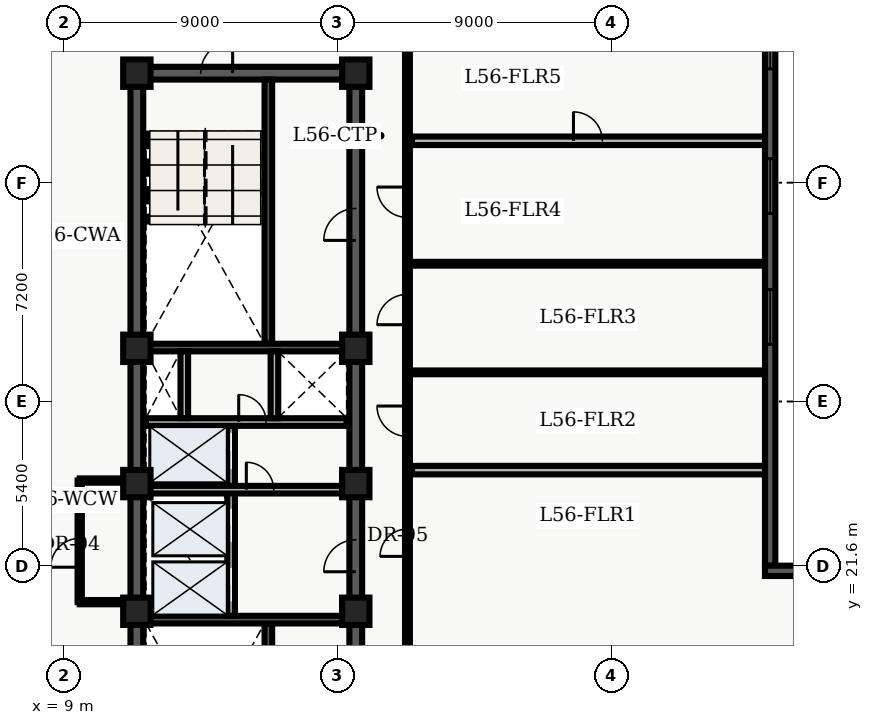
"""IFC4 building model, lengths in metres.
Left out: names, types, materials, properties, quantities, classifications, styles, units other than length and angle.
Written with IfcOpenShell. Run it as: python <this file> out.ifc"""

import sys

from ifc_helpers import new_model, entity, si_unit, converted_unit, direction, frame, origin_with_axes, origin_2d_with_axis, place, context, subcontext, project, spatial, polyline, rectangle, outline, extrude, element, fill, save


model = new_model("IFC4")
c1 = context("Model", 3, precision=1e-05, world=origin_with_axes(), true_north=direction((0.0, 1.0)))
c2 = subcontext(c1, "Body", "Model", "MODEL_VIEW")
j1 = project(units=[si_unit("LENGTHUNIT", "METRE"), converted_unit("PLANEANGLEUNIT", "DEGREE", entity("IfcPlaneAngleMeasure", 0.017), si_unit("PLANEANGLEUNIT", "RADIAN"), dimensions=[0, 0, 0, 0, 0, 0, 0])], contexts=[c1])
p1 = place(None, origin_with_axes())
s1 = spatial("IfcSite", under=j1, at=p1, CompositionType="ELEMENT")
p2 = place(p1, origin_with_axes())
s2 = spatial("IfcBuilding", under=s1, at=p2, CompositionType="ELEMENT")
p3 = place(p2, frame((0.0, 0.0, 228.6), z_axis=(0.0, 0.0, 1.0), x_axis=(1.0, 0.0, 0.0)))
s3 = spatial("IfcBuildingStorey", under=s2, at=p3, CompositionType="ELEMENT", Elevation=228.6)
p4 = place(p3, frame((11.4, 10.8, 0.0), z_axis=(0.0, 0.0, 1.0), x_axis=(0.0, 1.0, 0.0)))
e1 = element("IfcWall", 1, at=p4, inside=s3, PredefinedType="SHEAR", context=c2, shape_type="SweptSolid", body=[
    extrude(outline(polyline([(0.0, -0.21), (27.0, -0.21), (27.0, 0.21), (0.0, 0.21), (0.0, -0.21)])), origin_with_axes(), (0.0, 0.0, 1.0), 3.66),
])
p5 = place(p3, frame((11.4, 37.8, 0.0), z_axis=(0.0, 0.0, 1.0), x_axis=(1.0, 0.0, 0.0)))
e2 = element("IfcWall", 2, at=p5, inside=s3, PredefinedType="SHEAR", context=c2, shape_type="SweptSolid", body=[
    extrude(outline(polyline([(0.0, -0.21), (7.2, -0.21), (7.2, 0.21), (0.0, 0.21), (0.0, -0.21)])), origin_with_axes(), (0.0, 0.0, 1.0), 3.66),
])
p6 = place(p5, frame((2.625, 0.0, 0.0), z_axis=(0.0, 0.0, 1.0), x_axis=(1.0, 0.0, 0.0)))
e3 = element("IfcOpeningElement", 3, at=p6, cuts=e2, PredefinedType="OPENING", context=c2, shape_type="SweptSolid", body=[
    extrude(rectangle(XDim=1.05, YDim=0.44, at=origin_2d_with_axis()), origin_with_axes(), (0.0, 0.0, 1.0), 2.15),
])
p7 = place(p3, frame((18.6, 10.8, 0.0), z_axis=(0.0, 0.0, 1.0), x_axis=(0.0, 1.0, 0.0)))
e4 = element("IfcWall", 4, at=p7, inside=s3, PredefinedType="SHEAR", context=c2, shape_type="SweptSolid", body=[
    extrude(outline(polyline([(0.0, -0.21), (13.5, -0.21), (13.5, 0.21), (0.0, 0.21), (0.0, -0.21)])), origin_with_axes(), (0.0, 0.0, 1.0), 3.66),
])
p8 = place(p7, frame((1.3, 0.0, 0.0), z_axis=(0.0, 0.0, 1.0), x_axis=(1.0, 0.0, 0.0)))
e5 = element("IfcOpeningElement", 5, at=p8, cuts=e4, PredefinedType="OPENING", context=c2, shape_type="SweptSolid", body=[
    extrude(rectangle(XDim=1.1, YDim=0.44, at=origin_2d_with_axis()), origin_with_axes(), (0.0, 0.0, 1.0), 2.15),
])
p9 = place(p7, frame((3.4, 0.0, 0.0), z_axis=(0.0, 0.0, 1.0), x_axis=(1.0, 0.0, 0.0)))
e6 = element("IfcOpeningElement", 6, at=p9, cuts=e4, PredefinedType="OPENING", context=c2, shape_type="SweptSolid", body=[
    extrude(rectangle(XDim=1.1, YDim=0.44, at=origin_2d_with_axis()), origin_with_axes(), (0.0, 0.0, 1.0), 2.15),
])
p10 = place(p7, frame((11.125, 0.0, 0.0), z_axis=(0.0, 0.0, 1.0), x_axis=(1.0, 0.0, 0.0)))
e7 = element("IfcOpeningElement", 7, at=p10, cuts=e4, PredefinedType="OPENING", context=c2, shape_type="SweptSolid", body=[
    extrude(rectangle(XDim=1.05, YDim=0.44, at=origin_2d_with_axis()), origin_with_axes(), (0.0, 0.0, 1.0), 2.15),
])
p11 = place(p7, frame((6.675, 0.0, 0.0), z_axis=(0.0, 0.0, 1.0), x_axis=(1.0, 0.0, 0.0)))
e8 = element("IfcOpeningElement", 8, at=p11, cuts=e4, PredefinedType="OPENING", context=c2, shape_type="SweptSolid", body=[
    extrude(rectangle(XDim=0.95, YDim=0.44, at=origin_2d_with_axis()), origin_with_axes(), (0.0, 0.0, 1.0), 2.15),
])
p12 = place(p3, frame((18.6, 24.3, 0.0), z_axis=(0.0, 0.0, 1.0), x_axis=(0.0, 1.0, 0.0)))
e9 = element("IfcWall", 9, at=p12, inside=s3, PredefinedType="SHEAR", context=c2, shape_type="SweptSolid", body=[
    extrude(outline(polyline([(0.0, -0.21), (13.5, -0.21), (13.5, 0.21), (0.0, 0.21), (0.0, -0.21)])), origin_with_axes(), (0.0, 0.0, 1.0), 3.66),
])
p13 = place(p12, frame((8.525, 0.0, 0.0), z_axis=(0.0, 0.0, 1.0), x_axis=(1.0, 0.0, 0.0)))
e10 = element("IfcOpeningElement", 10, at=p13, cuts=e9, PredefinedType="OPENING", context=c2, shape_type="SweptSolid", body=[
    extrude(rectangle(XDim=1.05, YDim=0.44, at=origin_2d_with_axis()), origin_with_axes(), (0.0, 0.0, 1.0), 2.15),
])
p14 = place(p3, frame((15.725, 11.01, 0.0), z_axis=(0.0, 0.0, 1.0), x_axis=(0.0, 1.0, 0.0)))
e11 = element("IfcWall", 11, at=p14, inside=s3, PredefinedType="SHEAR", context=c2, shape_type="SweptSolid", body=[
    extrude(outline(polyline([(0.0, -0.125), (8.69, -0.125), (8.69, 0.125), (0.0, 0.125), (0.0, -0.125)])), origin_with_axes(), (0.0, 0.0, 1.0), 3.66),
])
p15 = place(p3, frame((11.61, 19.825, 0.0), z_axis=(0.0, 0.0, 1.0), x_axis=(1.0, 0.0, 0.0)))
e12 = element("IfcWall", 12, at=p15, inside=s3, PredefinedType="SHEAR", context=c2, shape_type="SweptSolid", body=[
    extrude(outline(polyline([(0.0, -0.125), (6.78, -0.125), (6.78, 0.125), (0.0, 0.125), (0.0, -0.125)])), origin_with_axes(), (0.0, 0.0, 1.0), 3.66),
])
p16 = place(p3, frame((15.725, 28.9, 0.0), z_axis=(0.0, 0.0, 1.0), x_axis=(0.0, 1.0, 0.0)))
e13 = element("IfcWall", 13, at=p16, inside=s3, PredefinedType="SHEAR", context=c2, shape_type="SweptSolid", body=[
    extrude(outline(polyline([(0.0, -0.125), (8.69, -0.125), (8.69, 0.125), (0.0, 0.125), (0.0, -0.125)])), origin_with_axes(), (0.0, 0.0, 1.0), 3.66),
])
p17 = place(p3, frame((11.61, 28.775, 0.0), z_axis=(0.0, 0.0, 1.0), x_axis=(1.0, 0.0, 0.0)))
e14 = element("IfcWall", 14, at=p17, inside=s3, PredefinedType="SHEAR", context=c2, shape_type="SweptSolid", body=[
    extrude(outline(polyline([(0.0, -0.125), (6.78, -0.125), (6.78, 0.125), (0.0, 0.125), (0.0, -0.125)])), origin_with_axes(), (0.0, 0.0, 1.0), 3.66),
])
p18 = place(p3, frame((14.5, 19.95, 0.0), z_axis=(0.0, 0.0, 1.0), x_axis=(0.0, 1.0, 0.0)))
e15 = element("IfcWall", 15, at=p18, inside=s3, PredefinedType="SOLIDWALL", context=c2, shape_type="SweptSolid", body=[
    extrude(outline(polyline([(0.0, -0.125), (6.25, -0.125), (6.25, 0.125), (0.0, 0.125), (0.0, -0.125)])), origin_with_axes(), (0.0, 0.0, 1.0), 2.7),
])
p19 = place(p18, frame((1.025, 0.0, 0.0), z_axis=(0.0, 0.0, 1.0), x_axis=(1.0, 0.0, 0.0)))
e16 = element("IfcOpeningElement", 16, at=p19, cuts=e15, PredefinedType="OPENING", context=c2, shape_type="SweptSolid", body=[
    extrude(rectangle(XDim=1.1, YDim=0.27, at=origin_2d_with_axis()), origin_with_axes(), (0.0, 0.0, 1.0), 2.15),
])
p20 = place(p18, frame((2.975, 0.0, 0.0), z_axis=(0.0, 0.0, 1.0), x_axis=(1.0, 0.0, 0.0)))
e17 = element("IfcOpeningElement", 17, at=p20, cuts=e15, PredefinedType="OPENING", context=c2, shape_type="SweptSolid", body=[
    extrude(rectangle(XDim=1.1, YDim=0.27, at=origin_2d_with_axis()), origin_with_axes(), (0.0, 0.0, 1.0), 2.15),
])
p21 = place(p18, frame((5.425, 0.0, 0.0), z_axis=(0.0, 0.0, 1.0), x_axis=(1.0, 0.0, 0.0)))
e18 = element("IfcOpeningElement", 18, at=p21, cuts=e15, PredefinedType="OPENING", context=c2, shape_type="SweptSolid", body=[
    extrude(rectangle(XDim=1.2, YDim=0.27, at=origin_2d_with_axis()), origin_with_axes(), (0.0, 0.0, 1.0), 2.15),
])
p22 = place(p3, frame((11.7, 24.1, 0.0), z_axis=(0.0, 0.0, 1.0), x_axis=(1.0, 0.0, 0.0)))
e19 = element("IfcWall", 19, at=p22, inside=s3, PredefinedType="SOLIDWALL", context=c2, shape_type="SweptSolid", body=[
    extrude(outline(polyline([(0.0, -0.125), (6.6, -0.125), (6.6, 0.125), (0.0, 0.125), (0.0, -0.125)])), origin_with_axes(), (0.0, 0.0, 1.0), 2.7),
])
p23 = place(p22, frame((3.75, 0.0, 0.0), z_axis=(0.0, 0.0, 1.0), x_axis=(1.0, 0.0, 0.0)))
e20 = element("IfcOpeningElement", 20, at=p23, cuts=e19, PredefinedType="OPENING", context=c2, shape_type="SweptSolid", body=[
    extrude(rectangle(XDim=0.9, YDim=0.27, at=origin_2d_with_axis()), origin_with_axes(), (0.0, 0.0, 1.0), 2.15),
])
p24 = place(p3, frame((11.7, 26.325, 0.0), z_axis=(0.0, 0.0, 1.0), x_axis=(1.0, 0.0, 0.0)))
e21 = element("IfcWall", 21, at=p24, inside=s3, PredefinedType="SOLIDWALL", context=c2, shape_type="SweptSolid", body=[
    extrude(outline(polyline([(0.0, -0.125), (6.6, -0.125), (6.6, 0.125), (0.0, 0.125), (0.0, -0.125)])), origin_with_axes(), (0.0, 0.0, 1.0), 2.7),
])
p25 = place(p24, frame((3.5, 0.0, 0.0), z_axis=(0.0, 0.0, 1.0), x_axis=(1.0, 0.0, 0.0)))
e22 = element("IfcOpeningElement", 22, at=p25, cuts=e21, PredefinedType="OPENING", context=c2, shape_type="SweptSolid", body=[
    extrude(rectangle(XDim=0.9, YDim=0.27, at=origin_2d_with_axis()), origin_with_axes(), (0.0, 0.0, 1.0), 2.15),
])
for number, where, z_axis, x_axis in (
    (23, (12.96, 26.45, 0.0), (0.0, 0.0, 1.0), (0.0, 1.0, 0.0)),
    (24, (15.925, 26.45, 0.0), (0.0, 0.0, 1.0), (0.0, 1.0, 0.0)),
):
    element("IfcWall", number, at=place(p3, frame(where, z_axis=z_axis, x_axis=x_axis)), inside=s3, PredefinedType="SOLIDWALL", context=c2, shape_type="SweptSolid", body=[
        extrude(outline(polyline([(0.0, -0.125), (2.2, -0.125), (2.2, 0.125), (0.0, 0.125), (0.0, -0.125)])), origin_with_axes(), (0.0, 0.0, 1.0), 2.7),
    ])
for number, where, z_axis, x_axis in (
    (25, (11.4, 20.1, 0.0), (0.0, 0.0, 1.0), (1.0, 0.0, 0.0)),
    (26, (11.4, 24.3, 0.0), (0.0, 0.0, 1.0), (1.0, 0.0, 0.0)),
    (27, (11.4, 28.75, 0.0), (0.0, 0.0, 1.0), (1.0, 0.0, 0.0)),
    (28, (11.4, 37.8, 0.0), (0.0, 0.0, 1.0), (1.0, 0.0, 0.0)),
    (29, (18.6, 20.1, 0.0), (0.0, 0.0, 1.0), (1.0, 0.0, 0.0)),
    (30, (18.6, 24.3, 0.0), (0.0, 0.0, 1.0), (1.0, 0.0, 0.0)),
    (31, (18.6, 28.75, 0.0), (0.0, 0.0, 1.0), (1.0, 0.0, 0.0)),
    (32, (18.6, 37.8, 0.0), (0.0, 0.0, 1.0), (1.0, 0.0, 0.0)),
):
    element("IfcColumn", number, at=place(p3, frame(where, z_axis=z_axis, x_axis=x_axis)), inside=s3, PredefinedType="COLUMN", context=c2, shape_type="SweptSolid", body=[
        extrude(rectangle(XDim=0.9, YDim=0.9, at=origin_2d_with_axis()), origin_with_axes(), (0.0, 0.0, 1.0), 3.9),
    ])
p26 = place(p3, frame((9.52, 20.4, 0.0), z_axis=(0.0, 0.0, 1.0), x_axis=(0.0, 1.0, 0.0)))
e33 = element("IfcWall", 33, at=p26, inside=s3, PredefinedType="PARTITIONING", context=c2, shape_type="SweptSolid", body=[
    extrude(outline(polyline([(0.0, -0.07), (4.0, -0.07), (4.0, 0.07), (0.0, 0.07), (0.0, -0.07)])), origin_with_axes(), (0.0, 0.0, 1.0), 2.7),
])
p27 = place(p26, frame((1.625, 0.0, 0.0), z_axis=(0.0, 0.0, 1.0), x_axis=(1.0, 0.0, 0.0)))
e34 = element("IfcOpeningElement", 34, at=p27, cuts=e33, PredefinedType="OPENING", context=c2, shape_type="SweptSolid", body=[
    extrude(rectangle(XDim=0.95, YDim=0.16, at=origin_2d_with_axis()), origin_with_axes(), (0.0, 0.0, 1.0), 2.15),
])
for number, where, z_axis, x_axis in (
    (35, (9.52, 20.4, 0.0), (0.0, 0.0, 1.0), (1.0, 0.0, 0.0)),
    (36, (9.52, 24.4, 0.0), (0.0, 0.0, 1.0), (1.0, 0.0, 0.0)),
):
    element("IfcWall", number, at=place(p3, frame(where, z_axis=z_axis, x_axis=x_axis)), inside=s3, PredefinedType="PARTITIONING", context=c2, shape_type="SweptSolid", body=[
        extrude(outline(polyline([(0.0, -0.07), (1.58, -0.07), (1.58, 0.07), (0.0, 0.07), (0.0, -0.07)])), origin_with_axes(), (0.0, 0.0, 1.0), 2.7),
    ])
p28 = place(p3, frame((20.3, 7.8, 0.0), z_axis=(0.0, 0.0, 1.0), x_axis=(0.0, 1.0, 0.0)))
e37 = element("IfcWall", 37, at=p28, inside=s3, PredefinedType="PARTITIONING", context=c2, shape_type="SweptSolid", body=[
    extrude(outline(polyline([(0.0, -0.08), (32.7, -0.08), (32.7, 0.08), (0.0, 0.08), (0.0, -0.08)])), origin_with_axes(), (0.0, 0.0, 1.0), 2.7),
])
p29 = place(p28, frame((14.556, 0.0, 0.0), z_axis=(0.0, 0.0, 1.0), x_axis=(1.0, 0.0, 0.0)))
e38 = element("IfcOpeningElement", 38, at=p29, cuts=e37, PredefinedType="OPENING", context=c2, shape_type="SweptSolid", body=[
    extrude(rectangle(XDim=0.9, YDim=0.18, at=origin_2d_with_axis()), origin_with_axes(), (0.0, 0.0, 1.0), 2.15),
])
p30 = place(p28, frame((18.551, 0.0, 0.0), z_axis=(0.0, 0.0, 1.0), x_axis=(1.0, 0.0, 0.0)))
e39 = element("IfcOpeningElement", 39, at=p30, cuts=e37, PredefinedType="OPENING", context=c2, shape_type="SweptSolid", body=[
    extrude(rectangle(XDim=1.0, YDim=0.18, at=origin_2d_with_axis()), origin_with_axes(), (0.0, 0.0, 1.0), 2.15),
])
p31 = place(p28, frame((22.226, 0.0, 0.0), z_axis=(0.0, 0.0, 1.0), x_axis=(1.0, 0.0, 0.0)))
e40 = element("IfcOpeningElement", 40, at=p31, cuts=e37, PredefinedType="OPENING", context=c2, shape_type="SweptSolid", body=[
    extrude(rectangle(XDim=1.0, YDim=0.18, at=origin_2d_with_axis()), origin_with_axes(), (0.0, 0.0, 1.0), 2.15),
])
p32 = place(p28, frame((25.754, 0.0, 0.0), z_axis=(0.0, 0.0, 1.0), x_axis=(1.0, 0.0, 0.0)))
e41 = element("IfcOpeningElement", 41, at=p32, cuts=e37, PredefinedType="OPENING", context=c2, shape_type="SweptSolid", body=[
    extrude(rectangle(XDim=1.0, YDim=0.18, at=origin_2d_with_axis()), origin_with_axes(), (0.0, 0.0, 1.0), 2.15),
])
p33 = place(p28, frame((5.775, 0.0, 0.0), z_axis=(0.0, 0.0, 1.0), x_axis=(1.0, 0.0, 0.0)))
e42 = element("IfcOpeningElement", 42, at=p33, cuts=e37, PredefinedType="OPENING", context=c2, shape_type="SweptSolid", body=[
    extrude(rectangle(XDim=1.05, YDim=0.18, at=origin_2d_with_axis()), origin_with_axes(), (0.0, 0.0, 1.0), 2.15),
])
p34 = place(p3, frame((20.45, 24.743, 0.0), z_axis=(0.0, 0.0, 1.0), x_axis=(1.0, 0.0, 0.0)))
e43 = element("IfcWall", 43, at=p34, inside=s3, PredefinedType="PARTITIONING", context=c2, shape_type="SweptSolid", body=[
    extrude(outline(polyline([(0.0, -0.14), (11.615, -0.14), (11.615, 0.14), (0.0, 0.14), (0.0, -0.14)])), origin_with_axes(), (0.0, 0.0, 1.0), 2.7),
])
for number, where, z_axis, x_axis in (
    (44, (20.45, 27.959, 0.0), (0.0, 0.0, 1.0), (1.0, 0.0, 0.0)),
    (45, (20.45, 31.532, 0.0), (0.0, 0.0, 1.0), (1.0, 0.0, 0.0)),
):
    element("IfcWall", number, at=place(p3, frame(where, z_axis=z_axis, x_axis=x_axis)), inside=s3, PredefinedType="PARTITIONING", context=c2, shape_type="SweptSolid", body=[
        extrude(outline(polyline([(0.0, -0.062), (11.615, -0.062), (11.615, 0.062), (0.0, 0.062), (0.0, -0.062)])), origin_with_axes(), (0.0, 0.0, 1.0), 2.7),
    ])
p35 = place(p3, frame((20.45, 35.576, 0.0), z_axis=(0.0, 0.0, 1.0), x_axis=(1.0, 0.0, 0.0)))
e46 = element("IfcWall", 46, at=p35, inside=s3, PredefinedType="PARTITIONING", context=c2, shape_type="SweptSolid", body=[
    extrude(outline(polyline([(0.0, -0.14), (11.615, -0.14), (11.615, 0.14), (0.0, 0.14), (0.0, -0.14)])), origin_with_axes(), (0.0, 0.0, 1.0), 2.7),
])
p36 = place(p35, frame((5.785, 0.0, 0.0), z_axis=(0.0, 0.0, 1.0), x_axis=(1.0, 0.0, 0.0)))
e47 = element("IfcOpeningElement", 47, at=p36, cuts=e46, PredefinedType="OPENING", context=c2, shape_type="SweptSolid", body=[
    extrude(rectangle(XDim=0.95, YDim=0.3, at=origin_2d_with_axis()), origin_with_axes(), (0.0, 0.0, 1.0), 2.15),
])
p37 = place(p3, frame((32.23, 41.82, 0.0), z_axis=(0.0, 0.0, 1.0), x_axis=(0.0, -1.0, 0.0)))
e48 = element("IfcWall", 48, at=p37, inside=s3, PredefinedType="SOLIDWALL", context=c2, shape_type="SweptSolid", body=[
    extrude(outline(polyline([(0.0, -0.17), (20.22, -0.17), (20.22, 0.17), (0.0, 0.17), (0.0, -0.17)])), origin_with_axes(), (0.0, 0.0, 1.0), 3.66),
])
p38 = place(p37, frame((2.978, 0.0, 0.45), z_axis=(0.0, 0.0, 1.0), x_axis=(1.0, 0.0, 0.0)))
e49 = element("IfcOpeningElement", 49, at=p38, cuts=e48, PredefinedType="OPENING", context=c2, shape_type="SweptSolid", body=[
    extrude(rectangle(XDim=1.8, YDim=0.36, at=origin_2d_with_axis()), origin_with_axes(), (0.0, 0.0, 1.0), 2.1),
])
p39 = place(p37, frame((7.732, 0.0, 0.45), z_axis=(0.0, 0.0, 1.0), x_axis=(1.0, 0.0, 0.0)))
e50 = element("IfcOpeningElement", 50, at=p39, cuts=e48, PredefinedType="OPENING", context=c2, shape_type="SweptSolid", body=[
    extrude(rectangle(XDim=1.8, YDim=0.36, at=origin_2d_with_axis()), origin_with_axes(), (0.0, 0.0, 1.0), 2.1),
])
p40 = place(p37, frame((12.037, 0.0, 0.45), z_axis=(0.0, 0.0, 1.0), x_axis=(1.0, 0.0, 0.0)))
e51 = element("IfcOpeningElement", 51, at=p40, cuts=e48, PredefinedType="OPENING", context=c2, shape_type="SweptSolid", body=[
    extrude(rectangle(XDim=1.8, YDim=0.36, at=origin_2d_with_axis()), origin_with_axes(), (0.0, 0.0, 1.0), 2.1),
])
p41 = place(p3, frame((32.06, 21.43, 0.0), z_axis=(0.0, 0.0, 1.0), x_axis=(1.0, 0.0, 0.0)))
e52 = element("IfcWall", 52, at=p41, inside=s3, PredefinedType="SOLIDWALL", context=c2, shape_type="SweptSolid", body=[
    extrude(outline(polyline([(0.0, -0.17), (3.94, -0.17), (3.94, 0.17), (0.0, 0.17), (0.0, -0.17)])), origin_with_axes(), (0.0, 0.0, 1.0), 3.66),
])
p42 = place(p18, frame((1.025, 0.0, 0.0), z_axis=(0.0, 0.0, 1.0), x_axis=(1.0, 0.0, 0.0)))
e53 = element("IfcDoor", 53, at=p42, inside=s3, OperationType="SLIDING_TO_LEFT", PredefinedType="DOOR", context=c2, shape_type="SweptSolid", body=[
    extrude(rectangle(XDim=1.1, YDim=0.09, at=origin_2d_with_axis()), origin_with_axes(), (0.0, 0.0, 1.0), 2.15),
])
fill(e16, e53)
p43 = place(p18, frame((2.975, 0.0, 0.0), z_axis=(0.0, 0.0, 1.0), x_axis=(1.0, 0.0, 0.0)))
e54 = element("IfcDoor", 54, at=p43, inside=s3, OperationType="SLIDING_TO_RIGHT", PredefinedType="DOOR", context=c2, shape_type="SweptSolid", body=[
    extrude(rectangle(XDim=1.1, YDim=0.09, at=origin_2d_with_axis()), origin_with_axes(), (0.0, 0.0, 1.0), 2.15),
])
fill(e17, e54)
p44 = place(p18, frame((5.425, 0.0, 0.0), z_axis=(0.0, 0.0, 1.0), x_axis=(1.0, 0.0, 0.0)))
e55 = element("IfcDoor", 55, at=p44, inside=s3, OperationType="DOUBLE_DOOR_SLIDING", PredefinedType="DOOR", context=c2, shape_type="SweptSolid", body=[
    extrude(rectangle(XDim=1.2, YDim=0.09, at=origin_2d_with_axis()), origin_with_axes(), (0.0, 0.0, 1.0), 2.15),
])
fill(e18, e55)
p45 = place(p5, frame((2.625, 0.0, 0.0), z_axis=(0.0, 0.0, 1.0), x_axis=(1.0, 0.0, 0.0)))
e56 = element("IfcDoor", 56, at=p45, inside=s3, OperationType="SINGLE_SWING_RIGHT", PredefinedType="DOOR", context=c2, shape_type="SweptSolid", body=[
    extrude(rectangle(XDim=1.05, YDim=0.09, at=origin_2d_with_axis()), origin_with_axes(), (0.0, 0.0, 1.0), 2.15),
])
fill(e3, e56)
p46 = place(p7, frame((11.125, 0.0, 0.0), z_axis=(0.0, 0.0, 1.0), x_axis=(1.0, 0.0, 0.0)))
e57 = element("IfcDoor", 57, at=p46, inside=s3, OperationType="SINGLE_SWING_LEFT", PredefinedType="DOOR", context=c2, shape_type="SweptSolid", body=[
    extrude(rectangle(XDim=1.05, YDim=0.09, at=origin_2d_with_axis()), origin_with_axes(), (0.0, 0.0, 1.0), 2.15),
])
fill(e7, e57)
p47 = place(p22, frame((3.75, 0.0, 0.0), z_axis=(0.0, 0.0, 1.0), x_axis=(1.0, 0.0, 0.0)))
e58 = element("IfcDoor", 58, at=p47, inside=s3, OperationType="SINGLE_SWING_LEFT", PredefinedType="DOOR", context=c2, shape_type="SweptSolid", body=[
    extrude(rectangle(XDim=0.9, YDim=0.09, at=origin_2d_with_axis()), origin_with_axes(), (0.0, 0.0, 1.0), 2.15),
])
fill(e20, e58)
p48 = place(p24, frame((3.5, 0.0, 0.0), z_axis=(0.0, 0.0, 1.0), x_axis=(1.0, 0.0, 0.0)))
e59 = element("IfcDoor", 59, at=p48, inside=s3, OperationType="SINGLE_SWING_LEFT", PredefinedType="DOOR", context=c2, shape_type="SweptSolid", body=[
    extrude(rectangle(XDim=0.9, YDim=0.09, at=origin_2d_with_axis()), origin_with_axes(), (0.0, 0.0, 1.0), 2.15),
])
fill(e22, e59)
p49 = place(p12, frame((8.525, 0.0, 0.0), z_axis=(0.0, 0.0, 1.0), x_axis=(1.0, 0.0, 0.0)))
e60 = element("IfcDoor", 60, at=p49, inside=s3, OperationType="SINGLE_SWING_LEFT", PredefinedType="DOOR", context=c2, shape_type="SweptSolid", body=[
    extrude(rectangle(XDim=1.05, YDim=0.09, at=origin_2d_with_axis()), origin_with_axes(), (0.0, 0.0, 1.0), 2.15),
])
fill(e10, e60)
p50 = place(p26, frame((1.625, 0.0, 0.0), z_axis=(0.0, 0.0, 1.0), x_axis=(1.0, 0.0, 0.0)))
e61 = element("IfcDoor", 61, at=p50, inside=s3, OperationType="SINGLE_SWING_LEFT", PredefinedType="DOOR", context=c2, shape_type="SweptSolid", body=[
    extrude(rectangle(XDim=0.95, YDim=0.084, at=origin_2d_with_axis()), origin_with_axes(), (0.0, 0.0, 1.0), 2.15),
])
fill(e34, e61)
p51 = place(p28, frame((14.556, 0.0, 0.0), z_axis=(0.0, 0.0, 1.0), x_axis=(1.0, 0.0, 0.0)))
e62 = element("IfcDoor", 62, at=p51, inside=s3, OperationType="SINGLE_SWING_LEFT", PredefinedType="DOOR", context=c2, shape_type="SweptSolid", body=[
    extrude(rectangle(XDim=0.9, YDim=0.09, at=origin_2d_with_axis()), origin_with_axes(), (0.0, 0.0, 1.0), 2.15),
])
fill(e38, e62)
p52 = place(p28, frame((18.551, 0.0, 0.0), z_axis=(0.0, 0.0, 1.0), x_axis=(1.0, 0.0, 0.0)))
e63 = element("IfcDoor", 63, at=p52, inside=s3, OperationType="SINGLE_SWING_RIGHT", PredefinedType="DOOR", context=c2, shape_type="SweptSolid", body=[
    extrude(rectangle(XDim=1.0, YDim=0.09, at=origin_2d_with_axis()), origin_with_axes(), (0.0, 0.0, 1.0), 2.15),
])
fill(e39, e63)
p53 = place(p28, frame((22.226, 0.0, 0.0), z_axis=(0.0, 0.0, 1.0), x_axis=(1.0, 0.0, 0.0)))
e64 = element("IfcDoor", 64, at=p53, inside=s3, OperationType="SINGLE_SWING_LEFT", PredefinedType="DOOR", context=c2, shape_type="SweptSolid", body=[
    extrude(rectangle(XDim=1.0, YDim=0.09, at=origin_2d_with_axis()), origin_with_axes(), (0.0, 0.0, 1.0), 2.15),
])
fill(e40, e64)
p54 = place(p28, frame((25.754, 0.0, 0.0), z_axis=(0.0, 0.0, 1.0), x_axis=(1.0, 0.0, 0.0)))
e65 = element("IfcDoor", 65, at=p54, inside=s3, OperationType="SINGLE_SWING_RIGHT", PredefinedType="DOOR", context=c2, shape_type="SweptSolid", body=[
    extrude(rectangle(XDim=1.0, YDim=0.09, at=origin_2d_with_axis()), origin_with_axes(), (0.0, 0.0, 1.0), 2.15),
])
fill(e41, e65)
p55 = place(p35, frame((5.785, 0.0, 0.0), z_axis=(0.0, 0.0, 1.0), x_axis=(1.0, 0.0, 0.0)))
e66 = element("IfcDoor", 66, at=p55, inside=s3, OperationType="SINGLE_SWING_LEFT", PredefinedType="DOOR", context=c2, shape_type="SweptSolid", body=[
    extrude(rectangle(XDim=0.95, YDim=0.09, at=origin_2d_with_axis()), origin_with_axes(), (0.0, 0.0, 1.0), 2.15),
])
fill(e47, e66)
p56 = place(p37, frame((2.978, 0.0, 0.45), z_axis=(0.0, 0.0, 1.0), x_axis=(1.0, 0.0, 0.0)))
e67 = element("IfcWindow", 67, at=p56, inside=s3, PredefinedType="WINDOW", context=c2, shape_type="SweptSolid", body=[
    extrude(rectangle(XDim=1.8, YDim=0.09, at=origin_2d_with_axis()), origin_with_axes(), (0.0, 0.0, 1.0), 2.1),
])
fill(e49, e67)
p57 = place(p37, frame((7.732, 0.0, 0.45), z_axis=(0.0, 0.0, 1.0), x_axis=(1.0, 0.0, 0.0)))
e68 = element("IfcWindow", 68, at=p57, inside=s3, PredefinedType="WINDOW", context=c2, shape_type="SweptSolid", body=[
    extrude(rectangle(XDim=1.8, YDim=0.09, at=origin_2d_with_axis()), origin_with_axes(), (0.0, 0.0, 1.0), 2.1),
])
fill(e50, e68)
p58 = place(p37, frame((12.037, 0.0, 0.45), z_axis=(0.0, 0.0, 1.0), x_axis=(1.0, 0.0, 0.0)))
e69 = element("IfcWindow", 69, at=p58, inside=s3, PredefinedType="WINDOW", context=c2, shape_type="SweptSolid", body=[
    extrude(rectangle(XDim=1.8, YDim=0.09, at=origin_2d_with_axis()), origin_with_axes(), (0.0, 0.0, 1.0), 2.1),
])
fill(e51, e69)
save(model, sys.argv[1])
